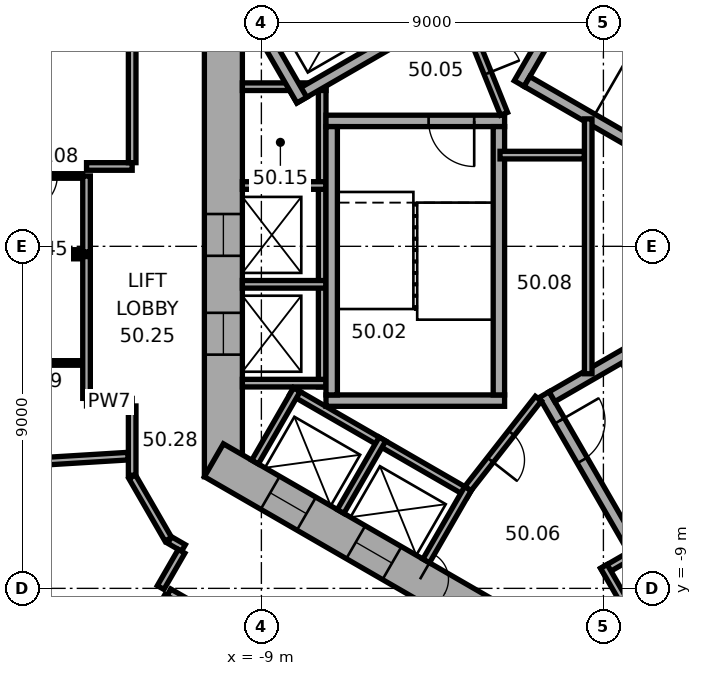
"""IFC4 building model, lengths in metres.
Left out: names, types, materials, properties, quantities, classifications, styles, units other than length and angle.
Written with IfcOpenShell. Run it as: python <this file> out.ifc"""

import sys

from ifc_helpers import new_model, si_unit, direction, frame, frame_2d, origin, place, context, subcontext, project, spatial, rectangle, extrude, element, fill, save


model = new_model("IFC4")
c1 = context("Model", 3, precision=1e-05, world=origin(), true_north=direction((0.0, 1.0)))
c2 = subcontext(c1, "Body", "Model", "MODEL_VIEW")
j1 = project(units=[si_unit("LENGTHUNIT", "METRE"), si_unit("PLANEANGLEUNIT", "RADIAN")], contexts=[c1])
p1 = place(None, origin())
s1 = spatial("IfcSite", under=j1, at=p1, CompositionType="ELEMENT")
p2 = place(p1, origin())
s2 = spatial("IfcBuilding", under=s1, at=p2, CompositionType="ELEMENT")
p3 = place(p2, frame((0.0, 0.0, 202.1)))
s3 = spatial("IfcBuildingStorey", under=s2, at=p3, CompositionType="ELEMENT", Elevation=202.1)
p4 = place(p3, frame((-10.0, 6.062, 0.0), z_axis=(0.0, 0.0, 1.0), x_axis=(0.0, -1.0, 0.0)))
e1 = element("IfcWall", 1, at=p4, inside=s3, PredefinedType="SHEAR", context=c2, shape_type="SweptSolid", body=[
    extrude(rectangle(XDim=12.125, YDim=1.0, at=frame_2d((6.062, 0.0))), origin(), (0.0, 0.0, 1.0), 3.7),
])
p5 = place(p4, frame((5.212, 0.0, 0.0)))
e2 = element("IfcOpeningElement", 2, at=p5, cuts=e1, PredefinedType="OPENING", context=c2, shape_type="SweptSolid", body=[
    extrude(rectangle(XDim=1.1, YDim=2.1, at=frame_2d((0.55, 1.05))), frame((0.0, 0.51, 0.0), z_axis=(0.0, -1.0, 0.0), x_axis=(1.0, 0.0, 0.0)), (0.0, 0.0, 1.0), 1.02),
])
p6 = place(p4, frame((7.812, 0.0, 0.0)))
e3 = element("IfcOpeningElement", 3, at=p6, cuts=e1, PredefinedType="OPENING", context=c2, shape_type="SweptSolid", body=[
    extrude(rectangle(XDim=1.1, YDim=2.1, at=frame_2d((0.55, 1.05))), frame((0.0, 0.51, 0.0), z_axis=(0.0, -1.0, 0.0), x_axis=(1.0, 0.0, 0.0)), (0.0, 0.0, 1.0), 1.02),
])
p7 = place(p3, frame((-10.25, -5.629, 0.0), z_axis=(0.0, 0.0, 1.0), x_axis=(0.866022616891, -0.50000482701, 0.0)))
e4 = element("IfcWall", 4, at=p7, inside=s3, PredefinedType="SHEAR", context=c2, shape_type="SweptSolid", body=[
    extrude(rectangle(XDim=12.125, YDim=1.0, at=frame_2d((6.062, 0.0))), origin(), (0.0, 0.0, 1.0), 3.7),
])
p8 = place(p7, frame((6.262, 0.0, 0.0)))
e5 = element("IfcOpeningElement", 5, at=p8, cuts=e4, PredefinedType="OPENING", context=c2, shape_type="SweptSolid", body=[
    extrude(rectangle(XDim=1.5, YDim=2.1, at=frame_2d((0.75, 1.05))), frame((0.0, 0.51, 0.0), z_axis=(0.0, -1.0, 0.0), x_axis=(1.0, 0.0, 0.0)), (0.0, 0.0, 1.0), 1.02),
])
p9 = place(p7, frame((1.712, 0.0, 0.0)))
e6 = element("IfcOpeningElement", 6, at=p9, cuts=e4, PredefinedType="OPENING", context=c2, shape_type="SweptSolid", body=[
    extrude(rectangle(XDim=1.1, YDim=2.1, at=frame_2d((0.55, 1.05))), frame((0.0, 0.51, 0.0), z_axis=(0.0, -1.0, 0.0), x_axis=(1.0, 0.0, 0.0)), (0.0, 0.0, 1.0), 1.02),
])
p10 = place(p7, frame((4.312, 0.0, 0.0)))
e7 = element("IfcOpeningElement", 7, at=p10, cuts=e4, PredefinedType="OPENING", context=c2, shape_type="SweptSolid", body=[
    extrude(rectangle(XDim=1.1, YDim=2.1, at=frame_2d((0.55, 1.05))), frame((0.0, 0.51, 0.0), z_axis=(0.0, -1.0, 0.0), x_axis=(1.0, 0.0, 0.0)), (0.0, 0.0, 1.0), 1.02),
])
p11 = place(p3, frame((-0.25, -11.691, 0.0), z_axis=(0.0, 0.0, 1.0), x_axis=(0.866022616891, 0.50000482701, 0.0)))
e8 = element("IfcWall", 8, at=p11, inside=s3, PredefinedType="SHEAR", context=c2, shape_type="SweptSolid", body=[
    extrude(rectangle(XDim=12.125, YDim=1.0, at=frame_2d((6.062, 0.0))), origin(), (0.0, 0.0, 1.0), 3.7),
])
p12 = place(p11, frame((2.612, 0.0, 0.0)))
e9 = element("IfcOpeningElement", 9, at=p12, cuts=e8, PredefinedType="OPENING", context=c2, shape_type="SweptSolid", body=[
    extrude(rectangle(XDim=1.1, YDim=2.1, at=frame_2d((0.55, 1.05))), frame((0.0, 0.51, 0.0), z_axis=(0.0, -1.0, 0.0), x_axis=(1.0, 0.0, 0.0)), (0.0, 0.0, 1.0), 1.02),
])
p13 = place(p11, frame((5.212, 0.0, 0.0)))
e10 = element("IfcOpeningElement", 10, at=p13, cuts=e8, PredefinedType="OPENING", context=c2, shape_type="SweptSolid", body=[
    extrude(rectangle(XDim=1.1, YDim=2.1, at=frame_2d((0.55, 1.05))), frame((0.0, 0.51, 0.0), z_axis=(0.0, -1.0, 0.0), x_axis=(1.0, 0.0, 0.0)), (0.0, 0.0, 1.0), 1.02),
])
p14 = place(p11, frame((7.812, 0.0, 0.0)))
e11 = element("IfcOpeningElement", 11, at=p14, cuts=e8, PredefinedType="OPENING", context=c2, shape_type="SweptSolid", body=[
    extrude(rectangle(XDim=1.1, YDim=2.1, at=frame_2d((0.55, 1.05))), frame((0.0, 0.51, 0.0), z_axis=(0.0, -1.0, 0.0), x_axis=(1.0, 0.0, 0.0)), (0.0, 0.0, 1.0), 1.02),
])
for number, where, z_axis, x_axis in (
    (12, (7.424, 4.259, 0.0), (0.0, 0.0, 1.0), (-0.866, 0.5, 0.0)),
    (13, (-7.4, 4.3, 0.0), (0.0, 0.0, 1.0), (0.0, -1.0, 0.0)),
):
    element("IfcWall", number, at=place(p3, frame(where, z_axis=z_axis, x_axis=x_axis)), inside=s3, PredefinedType="PARTITIONING", context=c2, shape_type="SweptSolid", body=[
        extrude(rectangle(XDim=8.0, YDim=0.2, at=frame_2d((4.0, 0.0))), origin(), (0.0, 0.0, 1.0), 3.35),
    ])
for number, where, z_axis, x_axis in (
    (14, (-7.3, 4.2, 0.0), (0.0, 0.0, 1.0), (-1.0, 0.0, 0.0)),
    (15, (-7.3, 1.6, 0.0), (0.0, 0.0, 1.0), (-1.0, 0.0, 0.0)),
    (16, (-7.3, -1.0, 0.0), (0.0, 0.0, 1.0), (-1.0, 0.0, 0.0)),
    (17, (-7.3, -3.6, 0.0), (0.0, 0.0, 1.0), (-1.0, 0.0, 0.0)),
):
    element("IfcWall", number, at=place(p3, frame(where, z_axis=z_axis, x_axis=x_axis)), inside=s3, PredefinedType="PARTITIONING", context=c2, shape_type="SweptSolid", body=[
        extrude(rectangle(XDim=2.2, YDim=0.2, at=frame_2d((1.1, 0.0))), origin(), (0.0, 0.0, 1.0), 3.35),
    ])
p15 = place(p3, frame((-8.203, -3.809, 0.0), z_axis=(0.0, 0.0, 1.0), x_axis=(0.866028230842, -0.499995103361, 0.0)))
e18 = element("IfcWall", 18, at=p15, inside=s3, PredefinedType="PARTITIONING", context=c2, shape_type="SweptSolid", body=[
    extrude(rectangle(XDim=5.4, YDim=0.2, at=frame_2d((2.7, 0.0))), origin(), (0.0, 0.0, 1.0), 3.35),
])
for number, where, z_axis, x_axis in (
    (19, (-8.067, -3.772, 0.0), (0.0, 0.0, 1.0), (-0.5, -0.866, 0.0)),
    (20, (-5.815, -5.072, 0.0), (0.0, 0.0, 1.0), (-0.5, -0.866, 0.0)),
):
    element("IfcWall", number, at=place(p3, frame(where, z_axis=z_axis, x_axis=x_axis)), inside=s3, PredefinedType="PARTITIONING", context=c2, shape_type="SweptSolid", body=[
        extrude(rectangle(XDim=2.2, YDim=0.2, at=frame_2d((1.1, 0.0))), origin(), (0.0, 0.0, 1.0), 3.35),
    ])
p16 = place(p3, frame((-3.563, -6.372, 0.0), z_axis=(0.0, 0.0, 1.0), x_axis=(-0.499994660107, -0.866028486751, 0.0)))
e21 = element("IfcWall", 21, at=p16, inside=s3, PredefinedType="PARTITIONING", context=c2, shape_type="SweptSolid", body=[
    extrude(rectangle(XDim=2.2, YDim=0.2, at=frame_2d((1.1, 0.0))), origin(), (0.0, 0.0, 1.0), 3.35),
])
p17 = place(p3, frame((-0.024, -8.559, 0.0), z_axis=(0.0, 0.0, 1.0), x_axis=(0.866026010844, 0.49999894854, 0.0)))
e22 = element("IfcWall", 22, at=p17, inside=s3, PredefinedType="PARTITIONING", context=c2, shape_type="SweptSolid", body=[
    extrude(rectangle(XDim=8.0, YDim=0.2, at=frame_2d((4.0, 0.0))), origin(), (0.0, 0.0, 1.0), 3.35),
])
p18 = place(p3, frame((0.013, -8.422, 0.0), z_axis=(0.0, 0.0, 1.0), x_axis=(0.500077893725, -0.86598042715, 0.0)))
e23 = element("IfcWall", 23, at=p18, inside=s3, PredefinedType="PARTITIONING", context=c2, shape_type="SweptSolid", body=[
    extrude(rectangle(XDim=2.2, YDim=0.2, at=frame_2d((1.1, 0.0))), origin(), (0.0, 0.0, 1.0), 3.35),
])
p19 = place(p3, frame((-2.216, 4.282, 0.0), z_axis=(0.0, 0.0, 1.0), x_axis=(0.499977259774, 0.866038532462, 0.0)))
e24 = element("IfcWall", 24, at=p19, inside=s3, PredefinedType="SHEAR", context=c2, shape_type="SweptSolid", body=[
    extrude(rectangle(XDim=4.7, YDim=0.3, at=frame_2d((2.35, 0.0))), origin(), (0.0, 0.0, 1.0), 3.35),
])
for number, where, z_axis, x_axis in (
    (25, (4.103, 0.807, 0.0), (0.0, 0.0, 1.0), (-0.866, 0.5, 0.0)),
    (26, (6.303, 4.617, 0.0), (0.0, 0.0, 1.0), (-0.866, 0.5, 0.0)),
):
    element("IfcWall", number, at=place(p3, frame(where, z_axis=z_axis, x_axis=x_axis)), inside=s3, PredefinedType="SHEAR", context=c2, shape_type="SweptSolid", body=[
        extrude(rectangle(XDim=7.06, YDim=0.3, at=frame_2d((3.53, 0.0))), origin(), (0.0, 0.0, 1.0), 3.35),
    ])
p20 = place(p3, frame((-2.6, 3.3, 0.0), z_axis=(0.0, 0.0, 1.0), x_axis=(-1.0, 0.0, 0.0)))
e27 = element("IfcWall", 27, at=p20, inside=s3, PredefinedType="SHEAR", context=c2, shape_type="SweptSolid", body=[
    extrude(rectangle(XDim=4.7, YDim=0.3, at=frame_2d((2.35, 0.0))), origin(), (0.0, 0.0, 1.0), 3.35),
])
p21 = place(p20, frame((0.8, 0.0, 0.0)))
e28 = element("IfcOpeningElement", 28, at=p21, cuts=e27, PredefinedType="OPENING", context=c2, shape_type="SweptSolid", body=[
    extrude(rectangle(XDim=1.2, YDim=2.1, at=frame_2d((0.6, 1.05))), frame((0.0, 0.16, 0.0), z_axis=(0.0, -1.0, 0.0), x_axis=(1.0, 0.0, 0.0)), (0.0, 0.0, 1.0), 0.32),
])
p22 = place(p3, frame((-2.6, -4.06, 0.0), z_axis=(0.0, 0.0, 1.0), x_axis=(-1.0, 0.0, 0.0)))
e29 = element("IfcWall", 29, at=p22, inside=s3, PredefinedType="SHEAR", context=c2, shape_type="SweptSolid", body=[
    extrude(rectangle(XDim=4.7, YDim=0.3, at=frame_2d((2.35, 0.0))), origin(), (0.0, 0.0, 1.0), 3.35),
])
for number, where, z_axis, x_axis in (
    (30, (-2.75, 3.15, 0.0), (0.0, 0.0, 1.0), (0.0, -1.0, 0.0)),
    (31, (-7.15, 3.15, 0.0), (0.0, 0.0, 1.0), (0.0, -1.0, 0.0)),
):
    element("IfcWall", number, at=place(p3, frame(where, z_axis=z_axis, x_axis=x_axis)), inside=s3, PredefinedType="SHEAR", context=c2, shape_type="SweptSolid", body=[
        extrude(rectangle(XDim=7.06, YDim=0.3, at=frame_2d((3.53, 0.0))), origin(), (0.0, 0.0, 1.0), 3.35),
    ])
p23 = place(p3, frame((-1.558, -3.902, 0.0), z_axis=(0.0, 0.0, 1.0), x_axis=(0.499977259774, -0.866038532462, 0.0)))
e32 = element("IfcWall", 32, at=p23, inside=s3, PredefinedType="SHEAR", context=c2, shape_type="SweptSolid", body=[
    extrude(rectangle(XDim=4.7, YDim=0.3, at=frame_2d((2.35, 0.0))), origin(), (0.0, 0.0, 1.0), 3.35),
])
p24 = place(p23, frame((0.8, 0.0, 0.0)))
e33 = element("IfcOpeningElement", 33, at=p24, cuts=e32, PredefinedType="OPENING", context=c2, shape_type="SweptSolid", body=[
    extrude(rectangle(XDim=1.2, YDim=2.1, at=frame_2d((0.6, 1.05))), frame((0.0, 0.16, 0.0), z_axis=(0.0, -1.0, 0.0), x_axis=(1.0, 0.0, 0.0)), (0.0, 0.0, 1.0), 0.32),
])
p25 = place(p3, frame((-1.353, -3.957, 0.0), z_axis=(0.0, 0.0, 1.0), x_axis=(0.866027801685, 0.499995846692, 0.0)))
e34 = element("IfcWall", 34, at=p25, inside=s3, PredefinedType="SHEAR", context=c2, shape_type="SweptSolid", body=[
    extrude(rectangle(XDim=7.06, YDim=0.3, at=frame_2d((3.53, 0.0))), origin(), (0.0, 0.0, 1.0), 3.35),
])
p26 = place(p3, frame((-5.24, 5.577, 0.0), z_axis=(0.0, 0.0, 1.0), x_axis=(-0.866014461049, -0.500018952895, 0.0)))
e35 = element("IfcWall", 35, at=p26, inside=s3, PredefinedType="SHEAR", context=c2, shape_type="SweptSolid", body=[
    extrude(rectangle(XDim=3.35, YDim=0.3, at=frame_2d((1.675, 0.0))), origin(), (0.0, 0.0, 1.0), 3.35),
])
p27 = place(p3, frame((-7.937, 3.847, 0.0), z_axis=(0.0, 0.0, 1.0), x_axis=(-0.50002983664, 0.866008176907, 0.0)))
e36 = element("IfcWall", 36, at=p27, inside=s3, PredefinedType="SHEAR", context=c2, shape_type="SweptSolid", body=[
    extrude(rectangle(XDim=2.2, YDim=0.3, at=frame_2d((1.1, 0.0))), origin(), (0.0, 0.0, 1.0), 3.35),
])
p28 = place(p3, frame((-2.615, 3.487, 0.0), z_axis=(0.0, 0.0, 1.0), x_axis=(-0.373576831041, 0.92759924068, 0.0)))
e37 = element("IfcWall", 37, at=p28, inside=s3, PredefinedType="PARTITIONING", context=c2, shape_type="SweptSolid", body=[
    extrude(rectangle(XDim=3.002, YDim=0.2, at=frame_2d((1.501, 0.0))), origin(), (0.0, 0.0, 1.0), 3.35),
])
p29 = place(p28, frame((1.15, 0.0, 0.0)))
e38 = element("IfcOpeningElement", 38, at=p29, cuts=e37, PredefinedType="OPENING", context=c2, shape_type="SweptSolid", body=[
    extrude(rectangle(XDim=0.9, YDim=2.1, at=frame_2d((0.45, 1.05))), frame((0.0, 0.11, 0.0), z_axis=(0.0, -1.0, 0.0), x_axis=(1.0, 0.0, 0.0)), (0.0, 0.0, 1.0), 0.22),
])
p30 = place(p3, frame((-1.712, -4.008, 0.0), z_axis=(0.0, 0.0, 1.0), x_axis=(-0.616549420702, -0.787316208287, 0.0)))
e39 = element("IfcWall", 39, at=p30, inside=s3, PredefinedType="PARTITIONING", context=c2, shape_type="SweptSolid", body=[
    extrude(rectangle(XDim=3.002, YDim=0.2, at=frame_2d((1.501, 0.0))), origin(), (0.0, 0.0, 1.0), 3.35),
])
p31 = place(p30, frame((1.15, 0.0, 0.0)))
e40 = element("IfcOpeningElement", 40, at=p31, cuts=e39, PredefinedType="OPENING", context=c2, shape_type="SweptSolid", body=[
    extrude(rectangle(XDim=0.9, YDim=2.1, at=frame_2d((0.45, 1.05))), frame((0.0, 0.11, 0.0), z_axis=(0.0, -1.0, 0.0), x_axis=(1.0, 0.0, 0.0)), (0.0, 0.0, 1.0), 0.22),
])
p32 = place(p3, frame((-2.72, 2.4, 0.0), z_axis=(0.0, 0.0, 1.0), x_axis=(1.0, 0.0, 0.0)))
e41 = element("IfcWall", 41, at=p32, inside=s3, PredefinedType="PARTITIONING", context=c2, shape_type="SweptSolid", body=[
    extrude(rectangle(XDim=2.22, YDim=0.2, at=frame_2d((1.11, 0.0))), origin(), (0.0, 0.0, 1.0), 3.35),
])
p33 = place(p3, frame((-0.4, -3.353, 0.0), z_axis=(0.0, 0.0, 1.0), x_axis=(0.0, 1.0, 0.0)))
e42 = element("IfcWall", 42, at=p33, inside=s3, PredefinedType="PARTITIONING", context=c2, shape_type="SweptSolid", body=[
    extrude(rectangle(XDim=6.707, YDim=0.2, at=frame_2d((3.353, 0.0))), origin(), (0.0, 0.0, 1.0), 3.35),
])
p34 = place(p3, frame((-20.421, -6.005, 0.0), z_axis=(0.0, 0.0, 1.0), x_axis=(0.998134865741, 0.061047438866, 0.0)))
e43 = element("IfcWall", 43, at=p34, inside=s3, PredefinedType="PARTITIONING", context=c2, shape_type="SweptSolid", body=[
    extrude(rectangle(XDim=7.927, YDim=0.2, at=frame_2d((3.963, 0.0))), origin(), (0.0, 0.0, 1.0), 2.55),
])
p35 = place(p3, frame((-16.741, -0.269, 0.0), z_axis=(0.0, 0.0, 1.0), x_axis=(1.0, 0.0, 0.0)))
e44 = element("IfcWall", 44, at=p35, inside=s3, PredefinedType="PARTITIONING", context=c2, shape_type="SweptSolid", body=[
    extrude(rectangle(XDim=3.04, YDim=0.12, at=frame_2d((1.52, 0.0))), origin(), (0.0, 0.0, 1.0), 3.35),
])
p36 = place(p3, frame((-15.941, 1.851, 0.0), z_axis=(0.0, 0.0, 1.0), x_axis=(1.0, 0.0, 0.0)))
e45 = element("IfcWall", 45, at=p36, inside=s3, PredefinedType="PARTITIONING", context=c2, shape_type="SweptSolid", body=[
    extrude(rectangle(XDim=2.24, YDim=0.12, at=frame_2d((1.12, 0.0))), origin(), (0.0, 0.0, 1.0), 3.35),
])
p37 = place(p36, frame((0.67, 0.0, 0.0)))
e46 = element("IfcOpeningElement", 46, at=p37, cuts=e45, PredefinedType="OPENING", context=c2, shape_type="SweptSolid", body=[
    extrude(rectangle(XDim=0.9, YDim=2.1, at=frame_2d((0.45, 1.05))), frame((0.0, 0.07, 0.0), z_axis=(0.0, -1.0, 0.0), x_axis=(1.0, 0.0, 0.0)), (0.0, 0.0, 1.0), 0.14),
])
p38 = place(p3, frame((-13.701, -3.069, 0.0), z_axis=(0.0, 0.0, 1.0), x_axis=(-1.0, 0.0, 0.0)))
e47 = element("IfcWall", 47, at=p38, inside=s3, PredefinedType="PARTITIONING", context=c2, shape_type="SweptSolid", body=[
    extrude(rectangle(XDim=3.04, YDim=0.12, at=frame_2d((1.52, 0.0))), origin(), (0.0, 0.0, 1.0), 3.35),
])
p39 = place(p38, frame((1.07, 0.0, 0.0)))
e48 = element("IfcOpeningElement", 48, at=p39, cuts=e47, PredefinedType="OPENING", context=c2, shape_type="SweptSolid", body=[
    extrude(rectangle(XDim=0.9, YDim=2.1, at=frame_2d((0.45, 1.05))), frame((0.0, 0.07, 0.0), z_axis=(0.0, -1.0, 0.0), x_axis=(1.0, 0.0, 0.0)), (0.0, 0.0, 1.0), 0.14),
])
p40 = place(p3, frame((-13.701, -0.149, 0.0), z_axis=(0.0, 0.0, 1.0), x_axis=(-1.0, 0.0, 0.0)))
e49 = element("IfcWall", 49, at=p40, inside=s3, PredefinedType="PARTITIONING", context=c2, shape_type="SweptSolid", body=[
    extrude(rectangle(XDim=2.24, YDim=0.12, at=frame_2d((1.12, 0.0))), origin(), (0.0, 0.0, 1.0), 3.35),
])
p41 = place(p3, frame((-13.601, -4.101, 0.0), z_axis=(0.0, 0.0, 1.0), x_axis=(1.0, 0.0, 0.0)))
e50 = element("IfcWall", 50, at=p41, inside=s3, PredefinedType="PARTITIONING", context=c2, shape_type="SweptSolid", body=[
    extrude(rectangle(XDim=1.201, YDim=0.2, at=frame_2d((0.601, 0.0))), origin(), (0.0, 0.0, 1.0), 3.35),
])
p42 = place(p3, frame((-13.601, -0.269, 0.0), z_axis=(0.0, 0.0, 1.0), x_axis=(0.0, -1.0, 0.0)))
e51 = element("IfcWall", 51, at=p42, inside=s3, PredefinedType="PARTITIONING", context=c2, shape_type="SweptSolid", body=[
    extrude(rectangle(XDim=3.732, YDim=0.2, at=frame_2d((1.866, 0.0))), origin(), (0.0, 0.0, 1.0), 3.35),
])
p43 = place(p3, frame((-13.601, 1.851, 0.0), z_axis=(0.0, 0.0, 1.0), x_axis=(0.0, -1.0, 0.0)))
e52 = element("IfcWall", 52, at=p43, inside=s3, PredefinedType="PARTITIONING", context=c2, shape_type="SweptSolid", body=[
    extrude(rectangle(XDim=2.0, YDim=0.2, at=frame_2d((1.0, 0.0))), origin(), (0.0, 0.0, 1.0), 3.35),
])
p44 = place(p3, frame((-12.735, -11.355, 0.0), z_axis=(0.0, 0.0, 1.0), x_axis=(0.500004234368, 0.866022959057, 0.0)))
e53 = element("IfcWall", 53, at=p44, inside=s3, PredefinedType="PARTITIONING", context=c2, shape_type="SweptSolid", body=[
    extrude(rectangle(XDim=2.5, YDim=0.12, at=frame_2d((1.25, 0.0))), origin(), (0.0, 0.0, 1.0), 3.35),
])
p45 = place(p3, frame((-12.4, -6.062, 0.0), z_axis=(0.0, 0.0, 1.0), x_axis=(0.500022797313, -0.86601224135, 0.0)))
e54 = element("IfcWall", 54, at=p45, inside=s3, PredefinedType="PARTITIONING", context=c2, shape_type="SweptSolid", body=[
    extrude(rectangle(XDim=1.9, YDim=0.2, at=frame_2d((0.95, 0.0))), origin(), (0.0, 0.0, 1.0), 3.35),
])
p46 = place(p3, frame((-12.4, -4.201, 0.0), z_axis=(0.0, 0.0, 1.0), x_axis=(0.0, -1.0, 0.0)))
e55 = element("IfcWall", 55, at=p46, inside=s3, PredefinedType="PARTITIONING", context=c2, shape_type="SweptSolid", body=[
    extrude(rectangle(XDim=1.821, YDim=0.2, at=frame_2d((0.911, 0.0))), origin(), (0.0, 0.0, 1.0), 3.35),
])
p47 = place(p3, frame((-12.4, 2.101, 0.0), z_axis=(0.0, 0.0, 1.0), x_axis=(-1.0, 0.0, 0.0)))
e56 = element("IfcWall", 56, at=p47, inside=s3, PredefinedType="PARTITIONING", context=c2, shape_type="SweptSolid", body=[
    extrude(rectangle(XDim=1.201, YDim=0.2, at=frame_2d((0.601, 0.0))), origin(), (0.0, 0.0, 1.0), 3.35),
])
p48 = place(p3, frame((-12.4, 6.062, 0.0), z_axis=(0.0, 0.0, 1.0), x_axis=(0.0, -1.0, 0.0)))
e57 = element("IfcWall", 57, at=p48, inside=s3, PredefinedType="PARTITIONING", context=c2, shape_type="SweptSolid", body=[
    extrude(rectangle(XDim=3.861, YDim=0.2, at=frame_2d((1.931, 0.0))), origin(), (0.0, 0.0, 1.0), 3.35),
])
p49 = place(p3, frame((-11.435, -9.103, 0.0), z_axis=(0.0, 0.0, 1.0), x_axis=(0.866007399799, -0.500031182522, 0.0)))
e58 = element("IfcWall", 58, at=p49, inside=s3, PredefinedType="PARTITIONING", context=c2, shape_type="SweptSolid", body=[
    extrude(rectangle(XDim=4.358, YDim=0.2, at=frame_2d((2.179, 0.0))), origin(), (0.0, 0.0, 1.0), 3.35),
])
p50 = place(p3, frame((-11.415, -7.728, 0.0), z_axis=(0.0, 0.0, 1.0), x_axis=(0.865915281873, -0.500190688257, 0.0)))
e59 = element("IfcWall", 59, at=p50, inside=s3, PredefinedType="PARTITIONING", context=c2, shape_type="SweptSolid", body=[
    extrude(rectangle(XDim=0.421, YDim=0.2, at=frame_2d((0.21, 0.0))), origin(), (0.0, 0.0, 1.0), 3.35),
])
p51 = place(p3, frame((-11.101, -8.025, 0.0), z_axis=(0.0, 0.0, 1.0), x_axis=(-0.500074377092, -0.865982457891, 0.0)))
e60 = element("IfcWall", 60, at=p51, inside=s3, PredefinedType="PARTITIONING", context=c2, shape_type="SweptSolid", body=[
    extrude(rectangle(XDim=1.101, YDim=0.2, at=frame_2d((0.55, 0.0))), origin(), (0.0, 0.0, 1.0), 3.35),
])
p52 = place(p8, origin())
e61 = element("IfcDoor", 61, at=p52, inside=s3, OperationType="DOUBLE_DOOR_SINGLE_SWING", PredefinedType="DOOR", context=c2, shape_type="SweptSolid", body=[
    extrude(rectangle(XDim=1.5, YDim=2.1, at=frame_2d((0.75, 1.05))), frame((0.0, 0.025, 0.0), z_axis=(0.0, -1.0, 0.0), x_axis=(1.0, 0.0, 0.0)), (0.0, 0.0, 1.0), 0.05),
])
fill(e5, e61)
p53 = place(p21, origin())
e62 = element("IfcDoor", 62, at=p53, inside=s3, OperationType="SINGLE_SWING_RIGHT", PredefinedType="DOOR", context=c2, shape_type="SweptSolid", body=[
    extrude(rectangle(XDim=1.2, YDim=2.1, at=frame_2d((0.6, 1.05))), frame((0.0, 0.025, 0.0), z_axis=(0.0, -1.0, 0.0), x_axis=(1.0, 0.0, 0.0)), (0.0, 0.0, 1.0), 0.05),
])
fill(e28, e62)
p54 = place(p24, origin())
e63 = element("IfcDoor", 63, at=p54, inside=s3, OperationType="SINGLE_SWING_RIGHT", PredefinedType="DOOR", context=c2, shape_type="SweptSolid", body=[
    extrude(rectangle(XDim=1.2, YDim=2.1, at=frame_2d((0.6, 1.05))), frame((0.0, 0.025, 0.0), z_axis=(0.0, -1.0, 0.0), x_axis=(1.0, 0.0, 0.0)), (0.0, 0.0, 1.0), 0.05),
])
fill(e33, e63)
p55 = place(p29, origin())
e64 = element("IfcDoor", 64, at=p55, inside=s3, OperationType="SINGLE_SWING_LEFT", PredefinedType="DOOR", context=c2, shape_type="SweptSolid", body=[
    extrude(rectangle(XDim=0.9, YDim=2.1, at=frame_2d((0.45, 1.05))), frame((0.0, 0.025, 0.0), z_axis=(0.0, -1.0, 0.0), x_axis=(1.0, 0.0, 0.0)), (0.0, 0.0, 1.0), 0.05),
])
fill(e38, e64)
p56 = place(p31, origin())
e65 = element("IfcDoor", 65, at=p56, inside=s3, OperationType="SINGLE_SWING_LEFT", PredefinedType="DOOR", context=c2, shape_type="SweptSolid", body=[
    extrude(rectangle(XDim=0.9, YDim=2.1, at=frame_2d((0.45, 1.05))), frame((0.0, 0.025, 0.0), z_axis=(0.0, -1.0, 0.0), x_axis=(1.0, 0.0, 0.0)), (0.0, 0.0, 1.0), 0.05),
])
fill(e40, e65)
p57 = place(p5, origin())
e66 = element("IfcDoor", 66, at=p57, inside=s3, OperationType="DOUBLE_DOOR_SLIDING", PredefinedType="DOOR", context=c2, shape_type="SweptSolid", body=[
    extrude(rectangle(XDim=1.1, YDim=2.1, at=frame_2d((0.55, 1.05))), frame((0.0, 0.025, 0.0), z_axis=(0.0, -1.0, 0.0), x_axis=(1.0, 0.0, 0.0)), (0.0, 0.0, 1.0), 0.05),
])
fill(e2, e66)
p58 = place(p6, origin())
e67 = element("IfcDoor", 67, at=p58, inside=s3, OperationType="DOUBLE_DOOR_SLIDING", PredefinedType="DOOR", context=c2, shape_type="SweptSolid", body=[
    extrude(rectangle(XDim=1.1, YDim=2.1, at=frame_2d((0.55, 1.05))), frame((0.0, 0.025, 0.0), z_axis=(0.0, -1.0, 0.0), x_axis=(1.0, 0.0, 0.0)), (0.0, 0.0, 1.0), 0.05),
])
fill(e3, e67)
p59 = place(p9, origin())
e68 = element("IfcDoor", 68, at=p59, inside=s3, OperationType="DOUBLE_DOOR_SLIDING", PredefinedType="DOOR", context=c2, shape_type="SweptSolid", body=[
    extrude(rectangle(XDim=1.1, YDim=2.1, at=frame_2d((0.55, 1.05))), frame((0.0, 0.025, 0.0), z_axis=(0.0, -1.0, 0.0), x_axis=(1.0, 0.0, 0.0)), (0.0, 0.0, 1.0), 0.05),
])
fill(e6, e68)
p60 = place(p10, origin())
e69 = element("IfcDoor", 69, at=p60, inside=s3, OperationType="DOUBLE_DOOR_SLIDING", PredefinedType="DOOR", context=c2, shape_type="SweptSolid", body=[
    extrude(rectangle(XDim=1.1, YDim=2.1, at=frame_2d((0.55, 1.05))), frame((0.0, 0.025, 0.0), z_axis=(0.0, -1.0, 0.0), x_axis=(1.0, 0.0, 0.0)), (0.0, 0.0, 1.0), 0.05),
])
fill(e7, e69)
p61 = place(p37, origin())
e70 = element("IfcDoor", 70, at=p61, inside=s3, OperationType="SINGLE_SWING_LEFT", PredefinedType="DOOR", context=c2, shape_type="SweptSolid", body=[
    extrude(rectangle(XDim=0.9, YDim=2.1, at=frame_2d((0.45, 1.05))), frame((0.0, 0.025, 0.0), z_axis=(0.0, -1.0, 0.0), x_axis=(1.0, 0.0, 0.0)), (0.0, 0.0, 1.0), 0.05),
])
fill(e46, e70)
save(model, sys.argv[1])
